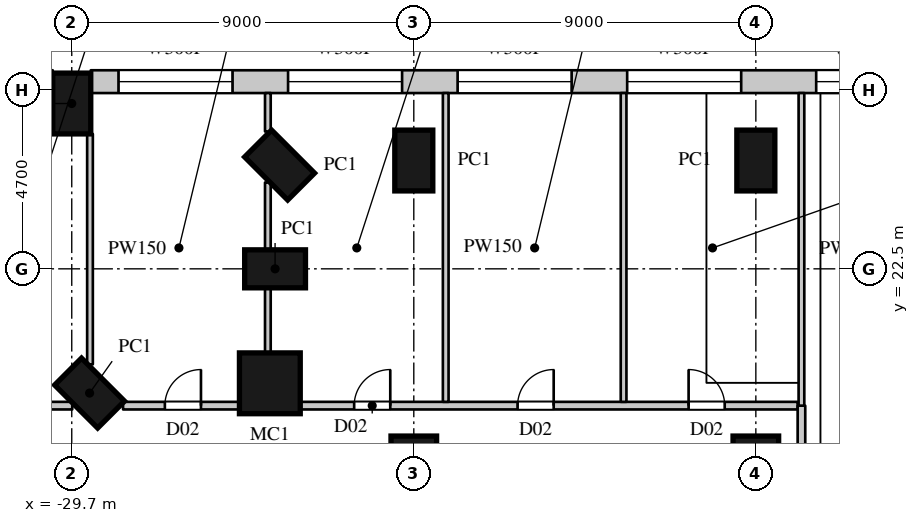
"""IFC4 building model, lengths in metres.
Left out: names, types, materials, properties, quantities, classifications, styles, units other than length and angle.
Written with IfcOpenShell. Run it as: python <this file> out.ifc"""

import sys

from ifc_helpers import new_model, si_unit, direction, frame, frame_2d, origin, origin_2d, place, context, subcontext, project, spatial, rectangle, circle, extrude, element, fill, save


model = new_model("IFC4")
c1 = context("Model", 3, precision=1e-05, world=origin(), true_north=direction((0.0, 1.0)))
c2 = subcontext(c1, "Body", "Model", "MODEL_VIEW")
j1 = project(units=[si_unit("LENGTHUNIT", "METRE"), si_unit("PLANEANGLEUNIT", "RADIAN")], contexts=[c1])
p1 = place(None, origin())
s1 = spatial("IfcSite", under=j1, at=p1, CompositionType="ELEMENT")
p2 = place(p1, origin())
s2 = spatial("IfcBuilding", under=s1, at=p2, CompositionType="ELEMENT")
p3 = place(p2, frame((0.0, 0.0, 36.0)))
s3 = spatial("IfcBuildingStorey", under=s2, at=p3, CompositionType="ELEMENT", Elevation=36.0)
for number, where, z_axis, x_axis in (
    (1, (-29.231, 19.231, 0.0), (0.0, 0.0, 1.0), (-0.707, -0.707, 0.0)),
    (2, (-11.7, 25.35, 0.0), (0.0, 0.0, 1.0), (-1.0, 0.0, 0.0)),
    (3, (-20.7, 25.35, 0.0), (0.0, 0.0, 1.0), (-1.0, 0.0, 0.0)),
    (4, (-24.231, 25.231, 0.0), (0.0, 0.0, 1.0), (-0.707, -0.707, 0.0)),
    (5, (-24.35, 22.5, 0.0), (0.0, 0.0, 1.0), (0.0, -1.0, 0.0)),
):
    element("IfcColumn", number, at=place(p3, frame(where, z_axis=z_axis, x_axis=x_axis)), inside=s3, PredefinedType="COLUMN", context=c2, shape_type="SweptSolid", body=[
        extrude(rectangle(XDim=1.0, YDim=1.6, at=origin_2d()), origin(), (0.0, 0.0, 1.0), 8.0),
    ])
p4 = place(p3, frame((-24.488, 19.488, 0.0), z_axis=(0.0, 0.0, 1.0), x_axis=(1.0, 0.0, 0.0)))
e6 = element("IfcColumn", 6, at=p4, inside=s3, PredefinedType="COLUMN", context=c2, shape_type="SweptSolid", body=[
    extrude(circle(Radius=0.8, at=origin_2d()), origin(), (0.0, 0.0, 1.0), 8.0),
])
p5 = place(p3, frame((-29.7, 26.85, 0.0), z_axis=(0.0, 0.0, 1.0), x_axis=(-1.0, 0.0, 0.0)))
e7 = element("IfcColumn", 7, at=p5, inside=s3, PredefinedType="COLUMN", context=c2, shape_type="SweptSolid", body=[
    extrude(rectangle(XDim=1.0, YDim=1.6, at=origin_2d()), origin(), (0.0, 0.0, 1.0), 8.0),
])
for number, where, z_axis, x_axis in (
    (8, (-20.7, 17.5, 0.0), (0.0, 0.0, 1.0), (1.0, 0.0, 0.0)),
    (9, (-11.7, 17.5, 0.0), (0.0, 0.0, 1.0), (1.0, 0.0, 0.0)),
):
    element("IfcColumn", number, at=place(p3, frame(where, z_axis=z_axis, x_axis=x_axis)), inside=s3, PredefinedType="COLUMN", context=c2, shape_type="SweptSolid", body=[
        extrude(circle(Radius=0.6, at=origin_2d()), origin(), (0.0, 0.0, 1.0), 8.0),
    ])
p6 = place(p3, frame((24.334, 27.425, 0.0), z_axis=(0.0, 0.0, 1.0), x_axis=(-1.0, 0.0, 0.0)))
e10 = element("IfcWall", 10, at=p6, inside=s3, PredefinedType="ELEMENTEDWALL", context=c2, shape_type="SweptSolid", body=[
    extrude(rectangle(XDim=53.534, YDim=0.6, at=frame_2d((26.767, 0.0))), origin(), (0.0, 0.0, 1.0), 7.6),
])
p7 = place(p6, frame((5.192, 0.0, 1.5)))
e11 = element("IfcOpeningElement", 11, at=p7, cuts=e10, PredefinedType="OPENING", context=c2, shape_type="SweptSolid", body=[
    extrude(rectangle(XDim=3.0, YDim=2.4, at=frame_2d((1.5, 1.2))), frame((0.0, 0.31, 0.0), z_axis=(0.0, -1.0, 0.0), x_axis=(1.0, 0.0, 0.0)), (0.0, 0.0, 1.0), 0.62),
])
p8 = place(p6, frame((14.114, 0.0, 1.5)))
e12 = element("IfcOpeningElement", 12, at=p8, cuts=e10, PredefinedType="OPENING", context=c2, shape_type="SweptSolid", body=[
    extrude(rectangle(XDim=3.0, YDim=2.4, at=frame_2d((1.5, 1.2))), frame((0.0, 0.31, 0.0), z_axis=(0.0, -1.0, 0.0), x_axis=(1.0, 0.0, 0.0)), (0.0, 0.0, 1.0), 0.62),
])
p9 = place(p6, frame((18.575, 0.0, 1.5)))
e13 = element("IfcOpeningElement", 13, at=p9, cuts=e10, PredefinedType="OPENING", context=c2, shape_type="SweptSolid", body=[
    extrude(rectangle(XDim=3.0, YDim=2.4, at=frame_2d((1.5, 1.2))), frame((0.0, 0.31, 0.0), z_axis=(0.0, -1.0, 0.0), x_axis=(1.0, 0.0, 0.0)), (0.0, 0.0, 1.0), 0.62),
])
p10 = place(p6, frame((23.037, 0.0, 1.5)))
e14 = element("IfcOpeningElement", 14, at=p10, cuts=e10, PredefinedType="OPENING", context=c2, shape_type="SweptSolid", body=[
    extrude(rectangle(XDim=3.0, YDim=2.4, at=frame_2d((1.5, 1.2))), frame((0.0, 0.31, 0.0), z_axis=(0.0, -1.0, 0.0), x_axis=(1.0, 0.0, 0.0)), (0.0, 0.0, 1.0), 0.62),
])
p11 = place(p6, frame((27.498, 0.0, 1.5)))
e15 = element("IfcOpeningElement", 15, at=p11, cuts=e10, PredefinedType="OPENING", context=c2, shape_type="SweptSolid", body=[
    extrude(rectangle(XDim=3.0, YDim=2.4, at=frame_2d((1.5, 1.2))), frame((0.0, 0.31, 0.0), z_axis=(0.0, -1.0, 0.0), x_axis=(1.0, 0.0, 0.0)), (0.0, 0.0, 1.0), 0.62),
])
p12 = place(p6, frame((36.42, 0.0, 1.5)))
e16 = element("IfcOpeningElement", 16, at=p12, cuts=e10, PredefinedType="OPENING", context=c2, shape_type="SweptSolid", body=[
    extrude(rectangle(XDim=3.0, YDim=2.4, at=frame_2d((1.5, 1.2))), frame((0.0, 0.31, 0.0), z_axis=(0.0, -1.0, 0.0), x_axis=(1.0, 0.0, 0.0)), (0.0, 0.0, 1.0), 0.62),
])
p13 = place(p6, frame((40.882, 0.0, 1.5)))
e17 = element("IfcOpeningElement", 17, at=p13, cuts=e10, PredefinedType="OPENING", context=c2, shape_type="SweptSolid", body=[
    extrude(rectangle(XDim=3.0, YDim=2.4, at=frame_2d((1.5, 1.2))), frame((0.0, 0.31, 0.0), z_axis=(0.0, -1.0, 0.0), x_axis=(1.0, 0.0, 0.0)), (0.0, 0.0, 1.0), 0.62),
])
p14 = place(p6, frame((45.343, 0.0, 1.5)))
e18 = element("IfcOpeningElement", 18, at=p14, cuts=e10, PredefinedType="OPENING", context=c2, shape_type="SweptSolid", body=[
    extrude(rectangle(XDim=3.0, YDim=2.4, at=frame_2d((1.5, 1.2))), frame((0.0, 0.31, 0.0), z_axis=(0.0, -1.0, 0.0), x_axis=(1.0, 0.0, 0.0)), (0.0, 0.0, 1.0), 0.62),
])
p15 = place(p6, frame((49.804, 0.0, 1.5)))
e19 = element("IfcOpeningElement", 19, at=p15, cuts=e10, PredefinedType="OPENING", context=c2, shape_type="SweptSolid", body=[
    extrude(rectangle(XDim=3.0, YDim=2.4, at=frame_2d((1.5, 1.2))), frame((0.0, 0.31, 0.0), z_axis=(0.0, -1.0, 0.0), x_axis=(1.0, 0.0, 0.0)), (0.0, 0.0, 1.0), 0.62),
])
p16 = place(p6, frame((0.782, 0.0, 1.5)))
e20 = element("IfcOpeningElement", 20, at=p16, cuts=e10, PredefinedType="OPENING", context=c2, shape_type="SweptSolid", body=[
    extrude(rectangle(XDim=1.2, YDim=2.4, at=frame_2d((0.6, 1.2))), frame((0.0, 0.31, 0.0), z_axis=(0.0, -1.0, 0.0), x_axis=(1.0, 0.0, 0.0)), (0.0, 0.0, 1.0), 0.62),
])
p17 = place(p6, frame((2.733, 0.0, 1.5)))
e21 = element("IfcOpeningElement", 21, at=p17, cuts=e10, PredefinedType="OPENING", context=c2, shape_type="SweptSolid", body=[
    extrude(rectangle(XDim=0.9, YDim=2.4, at=frame_2d((0.45, 1.2))), frame((0.0, 0.31, 0.0), z_axis=(0.0, -1.0, 0.0), x_axis=(1.0, 0.0, 0.0)), (0.0, 0.0, 1.0), 0.62),
])
p18 = place(p6, frame((10.194, 0.0, 1.5)))
e22 = element("IfcOpeningElement", 22, at=p18, cuts=e10, PredefinedType="OPENING", context=c2, shape_type="SweptSolid", body=[
    extrude(rectangle(XDim=2.4, YDim=2.4, at=frame_2d((1.2, 1.2))), frame((0.0, 0.31, 0.0), z_axis=(0.0, -1.0, 0.0), x_axis=(1.0, 0.0, 0.0)), (0.0, 0.0, 1.0), 0.62),
])
p19 = place(p6, frame((32.047, 0.0, 1.5)))
e23 = element("IfcOpeningElement", 23, at=p19, cuts=e10, PredefinedType="OPENING", context=c2, shape_type="SweptSolid", body=[
    extrude(rectangle(XDim=2.4, YDim=2.4, at=frame_2d((1.2, 1.2))), frame((0.0, 0.31, 0.0), z_axis=(0.0, -1.0, 0.0), x_axis=(1.0, 0.0, 0.0)), (0.0, 0.0, 1.0), 0.62),
])
p20 = place(p3, frame((-30.2, 27.425, 0.0), z_axis=(0.0, 0.0, 1.0), x_axis=(-1.0, 0.0, 0.0)))
e24 = element("IfcWall", 24, at=p20, inside=s3, PredefinedType="ELEMENTEDWALL", context=c2, shape_type="SweptSolid", body=[
    extrude(rectangle(XDim=7.793, YDim=0.6, at=frame_2d((3.896, 0.0))), origin(), (0.0, 0.0, 1.0), 7.6),
])
p21 = place(p20, frame((0.748, 0.0, 1.5)))
e25 = element("IfcOpeningElement", 25, at=p21, cuts=e24, PredefinedType="OPENING", context=c2, shape_type="SweptSolid", body=[
    extrude(rectangle(XDim=2.4, YDim=2.4, at=frame_2d((1.2, 1.2))), frame((0.0, 0.31, 0.0), z_axis=(0.0, -1.0, 0.0), x_axis=(1.0, 0.0, 0.0)), (0.0, 0.0, 1.0), 0.62),
])
p22 = place(p20, frame((4.645, 0.0, 1.5)))
e26 = element("IfcOpeningElement", 26, at=p22, cuts=e24, PredefinedType="OPENING", context=c2, shape_type="SweptSolid", body=[
    extrude(rectangle(XDim=2.4, YDim=2.4, at=frame_2d((1.2, 1.2))), frame((0.0, 0.31, 0.0), z_axis=(0.0, -1.0, 0.0), x_axis=(1.0, 0.0, 0.0)), (0.0, 0.0, 1.0), 0.62),
])
p23 = place(p3, frame((-33.05, 18.9, 0.0), z_axis=(0.0, 0.0, 1.0), x_axis=(1.0, 0.0, 0.0)))
e27 = element("IfcWall", 27, at=p23, inside=s3, PredefinedType="PARTITIONING", context=c2, shape_type="SweptSolid", body=[
    extrude(rectangle(XDim=3.363, YDim=0.2, at=frame_2d((1.682, 0.0))), origin(), (0.0, 0.0, 1.0), 7.598),
])
p24 = place(p23, frame((1.2, 0.0, 0.0)))
e28 = element("IfcOpeningElement", 28, at=p24, cuts=e27, PredefinedType="OPENING", context=c2, shape_type="SweptSolid", body=[
    extrude(rectangle(XDim=0.95, YDim=2.2, at=frame_2d((0.475, 1.1))), frame((0.0, 0.11, 0.0), z_axis=(0.0, -1.0, 0.0), x_axis=(1.0, 0.0, 0.0)), (0.0, 0.0, 1.0), 0.22),
])
p25 = place(p3, frame((-28.35, 18.9, 0.0), z_axis=(0.0, 0.0, 1.0), x_axis=(1.0, 0.0, 0.0)))
e29 = element("IfcWall", 29, at=p25, inside=s3, PredefinedType="PARTITIONING", context=c2, shape_type="SweptSolid", body=[
    extrude(rectangle(XDim=3.244, YDim=0.2, at=frame_2d((1.622, 0.0))), origin(), (0.0, 0.0, 1.0), 7.598),
])
p26 = place(p25, frame((1.1, 0.0, 0.0)))
e30 = element("IfcOpeningElement", 30, at=p26, cuts=e29, PredefinedType="OPENING", context=c2, shape_type="SweptSolid", body=[
    extrude(rectangle(XDim=0.95, YDim=2.2, at=frame_2d((0.475, 1.1))), frame((0.0, 0.11, 0.0), z_axis=(0.0, -1.0, 0.0), x_axis=(1.0, 0.0, 0.0)), (0.0, 0.0, 1.0), 0.22),
])
p27 = place(p3, frame((-23.869, 18.9, 0.0), z_axis=(0.0, 0.0, 1.0), x_axis=(1.0, 0.0, 0.0)))
e31 = element("IfcWall", 31, at=p27, inside=s3, PredefinedType="PARTITIONING", context=c2, shape_type="SweptSolid", body=[
    extrude(rectangle(XDim=13.269, YDim=0.2, at=frame_2d((6.635, 0.0))), origin(), (0.0, 0.0, 1.0), 7.598),
])
p28 = place(p27, frame((1.6, 0.0, 0.0)))
e32 = element("IfcOpeningElement", 32, at=p28, cuts=e31, PredefinedType="OPENING", context=c2, shape_type="SweptSolid", body=[
    extrude(rectangle(XDim=0.95, YDim=2.2, at=frame_2d((0.475, 1.1))), frame((0.0, 0.11, 0.0), z_axis=(0.0, -1.0, 0.0), x_axis=(1.0, 0.0, 0.0)), (0.0, 0.0, 1.0), 0.22),
])
p29 = place(p27, frame((5.9, 0.0, 0.0)))
e33 = element("IfcOpeningElement", 33, at=p29, cuts=e31, PredefinedType="OPENING", context=c2, shape_type="SweptSolid", body=[
    extrude(rectangle(XDim=0.95, YDim=2.2, at=frame_2d((0.475, 1.1))), frame((0.0, 0.11, 0.0), z_axis=(0.0, -1.0, 0.0), x_axis=(1.0, 0.0, 0.0)), (0.0, 0.0, 1.0), 0.22),
])
p30 = place(p27, frame((10.4, 0.0, 0.0)))
e34 = element("IfcOpeningElement", 34, at=p30, cuts=e31, PredefinedType="OPENING", context=c2, shape_type="SweptSolid", body=[
    extrude(rectangle(XDim=0.95, YDim=2.2, at=frame_2d((0.475, 1.1))), frame((0.0, 0.11, 0.0), z_axis=(0.0, -1.0, 0.0), x_axis=(1.0, 0.0, 0.0)), (0.0, 0.0, 1.0), 0.22),
])
p31 = place(p3, frame((-10.5, -18.9, 0.0), z_axis=(0.0, 0.0, 1.0), x_axis=(0.0, 1.0, 0.0)))
e35 = element("IfcWall", 35, at=p31, inside=s3, PredefinedType="PARTITIONING", context=c2, shape_type="SweptSolid", body=[
    extrude(rectangle(XDim=37.8, YDim=0.2, at=frame_2d((18.9, 0.0))), origin(), (0.0, 0.0, 1.0), 7.598),
])
p32 = place(p31, frame((18.15, 0.0, 0.0)))
e36 = element("IfcOpeningElement", 36, at=p32, cuts=e35, PredefinedType="OPENING", context=c2, shape_type="SweptSolid", body=[
    extrude(rectangle(XDim=1.5, YDim=2.4, at=frame_2d((0.75, 1.2))), frame((0.0, 0.11, 0.0), z_axis=(0.0, -1.0, 0.0), x_axis=(1.0, 0.0, 0.0)), (0.0, 0.0, 1.0), 0.22),
])
p33 = place(p3, frame((-29.22, 19.987, 0.0), z_axis=(0.0, 0.0, 1.0), x_axis=(0.0, 1.0, 0.0)))
e37 = element("IfcWall", 37, at=p33, inside=s3, PredefinedType="PARTITIONING", context=c2, shape_type="SweptSolid", body=[
    extrude(rectangle(XDim=6.063, YDim=0.15, at=frame_2d((3.031, 0.0))), origin(), (0.0, 0.0, 1.0), 7.598),
])
p34 = place(p3, frame((-24.54, 20.293, 0.0), z_axis=(0.0, 0.0, 1.0), x_axis=(0.0, 1.0, 0.0)))
e38 = element("IfcWall", 38, at=p34, inside=s3, PredefinedType="PARTITIONING", context=c2, shape_type="SweptSolid", body=[
    extrude(rectangle(XDim=1.707, YDim=0.15, at=frame_2d((0.854, 0.0))), origin(), (0.0, 0.0, 1.0), 7.598),
])
p35 = place(p3, frame((-24.54, 23.0, 0.0), z_axis=(0.0, 0.0, 1.0), x_axis=(0.0, 1.0, 0.0)))
e39 = element("IfcWall", 39, at=p35, inside=s3, PredefinedType="PARTITIONING", context=c2, shape_type="SweptSolid", body=[
    extrude(rectangle(XDim=1.773, YDim=0.15, at=frame_2d((0.886, 0.0))), origin(), (0.0, 0.0, 1.0), 7.598),
])
p36 = place(p3, frame((-24.54, 26.113, 0.0), z_axis=(0.0, 0.0, 1.0), x_axis=(0.0, 1.0, 0.0)))
e40 = element("IfcWall", 40, at=p36, inside=s3, PredefinedType="PARTITIONING", context=c2, shape_type="SweptSolid", body=[
    extrude(rectangle(XDim=1.012, YDim=0.15, at=frame_2d((0.506, 0.0))), origin(), (0.0, 0.0, 1.0), 7.598),
])
for number, where, z_axis, x_axis in (
    (41, (-19.86, 19.0, 0.0), (0.0, 0.0, 1.0), (0.0, 1.0, 0.0)),
    (42, (-15.18, 19.0, 0.0), (0.0, 0.0, 1.0), (0.0, 1.0, 0.0)),
):
    element("IfcWall", number, at=place(p3, frame(where, z_axis=z_axis, x_axis=x_axis)), inside=s3, PredefinedType="PARTITIONING", context=c2, shape_type="SweptSolid", body=[
        extrude(rectangle(XDim=8.125, YDim=0.15, at=frame_2d((4.062, 0.0))), origin(), (0.0, 0.0, 1.0), 7.598),
    ])
p37 = place(p3, frame((-10.5, 18.9, 0.0), z_axis=(0.0, 0.0, 1.0), x_axis=(0.0, 1.0, 0.0)))
e43 = element("IfcWall", 43, at=p37, inside=s3, PredefinedType="PARTITIONING", context=c2, shape_type="SweptSolid", body=[
    extrude(rectangle(XDim=8.225, YDim=0.15, at=frame_2d((4.113, 0.0))), origin(), (0.0, 0.0, 1.0), 7.598),
])
p38 = place(p12, origin())
e44 = element("IfcWindow", 44, at=p38, inside=s3, PartitioningType="SINGLE_PANEL", PredefinedType="WINDOW", context=c2, shape_type="SweptSolid", body=[
    extrude(rectangle(XDim=3.0, YDim=2.4, at=frame_2d((1.5, 1.2))), frame((0.0, 0.06, 0.0), z_axis=(0.0, -1.0, 0.0), x_axis=(1.0, 0.0, 0.0)), (0.0, 0.0, 1.0), 0.06),
])
fill(e16, e44)
p39 = place(p13, origin())
e45 = element("IfcWindow", 45, at=p39, inside=s3, PartitioningType="SINGLE_PANEL", PredefinedType="WINDOW", context=c2, shape_type="SweptSolid", body=[
    extrude(rectangle(XDim=3.0, YDim=2.4, at=frame_2d((1.5, 1.2))), frame((0.0, 0.06, 0.0), z_axis=(0.0, -1.0, 0.0), x_axis=(1.0, 0.0, 0.0)), (0.0, 0.0, 1.0), 0.06),
])
fill(e17, e45)
p40 = place(p14, origin())
e46 = element("IfcWindow", 46, at=p40, inside=s3, PartitioningType="SINGLE_PANEL", PredefinedType="WINDOW", context=c2, shape_type="SweptSolid", body=[
    extrude(rectangle(XDim=3.0, YDim=2.4, at=frame_2d((1.5, 1.2))), frame((0.0, 0.06, 0.0), z_axis=(0.0, -1.0, 0.0), x_axis=(1.0, 0.0, 0.0)), (0.0, 0.0, 1.0), 0.06),
])
fill(e18, e46)
p41 = place(p15, origin())
e47 = element("IfcWindow", 47, at=p41, inside=s3, PartitioningType="SINGLE_PANEL", PredefinedType="WINDOW", context=c2, shape_type="SweptSolid", body=[
    extrude(rectangle(XDim=3.0, YDim=2.4, at=frame_2d((1.5, 1.2))), frame((0.0, 0.06, 0.0), z_axis=(0.0, -1.0, 0.0), x_axis=(1.0, 0.0, 0.0)), (0.0, 0.0, 1.0), 0.06),
])
fill(e19, e47)
p42 = place(p26, origin())
e48 = element("IfcDoor", 48, at=p42, inside=s3, OperationType="SINGLE_SWING_RIGHT", PredefinedType="DOOR", context=c2, shape_type="SweptSolid", body=[
    extrude(rectangle(XDim=0.95, YDim=2.2, at=frame_2d((0.475, 1.1))), frame((0.0, 0.025, 0.0), z_axis=(0.0, -1.0, 0.0), x_axis=(1.0, 0.0, 0.0)), (0.0, 0.0, 1.0), 0.05),
])
fill(e30, e48)
p43 = place(p28, origin())
e49 = element("IfcDoor", 49, at=p43, inside=s3, OperationType="SINGLE_SWING_RIGHT", PredefinedType="DOOR", context=c2, shape_type="SweptSolid", body=[
    extrude(rectangle(XDim=0.95, YDim=2.2, at=frame_2d((0.475, 1.1))), frame((0.0, 0.025, 0.0), z_axis=(0.0, -1.0, 0.0), x_axis=(1.0, 0.0, 0.0)), (0.0, 0.0, 1.0), 0.05),
])
fill(e32, e49)
p44 = place(p29, origin())
e50 = element("IfcDoor", 50, at=p44, inside=s3, OperationType="SINGLE_SWING_RIGHT", PredefinedType="DOOR", context=c2, shape_type="SweptSolid", body=[
    extrude(rectangle(XDim=0.95, YDim=2.2, at=frame_2d((0.475, 1.1))), frame((0.0, 0.025, 0.0), z_axis=(0.0, -1.0, 0.0), x_axis=(1.0, 0.0, 0.0)), (0.0, 0.0, 1.0), 0.05),
])
fill(e33, e50)
p45 = place(p30, origin())
e51 = element("IfcDoor", 51, at=p45, inside=s3, OperationType="SINGLE_SWING_LEFT", PredefinedType="DOOR", context=c2, shape_type="SweptSolid", body=[
    extrude(rectangle(XDim=0.95, YDim=2.2, at=frame_2d((0.475, 1.1))), frame((0.0, 0.025, 0.0), z_axis=(0.0, -1.0, 0.0), x_axis=(1.0, 0.0, 0.0)), (0.0, 0.0, 1.0), 0.05),
])
fill(e34, e51)
p46 = place(p19, origin())
e52 = element("IfcWindow", 52, at=p46, inside=s3, PartitioningType="SINGLE_PANEL", PredefinedType="WINDOW", context=c2, shape_type="SweptSolid", body=[
    extrude(rectangle(XDim=2.4, YDim=2.4, at=frame_2d((1.2, 1.2))), frame((0.0, 0.06, 0.0), z_axis=(0.0, -1.0, 0.0), x_axis=(1.0, 0.0, 0.0)), (0.0, 0.0, 1.0), 0.06),
])
fill(e23, e52)
save(model, sys.argv[1])
